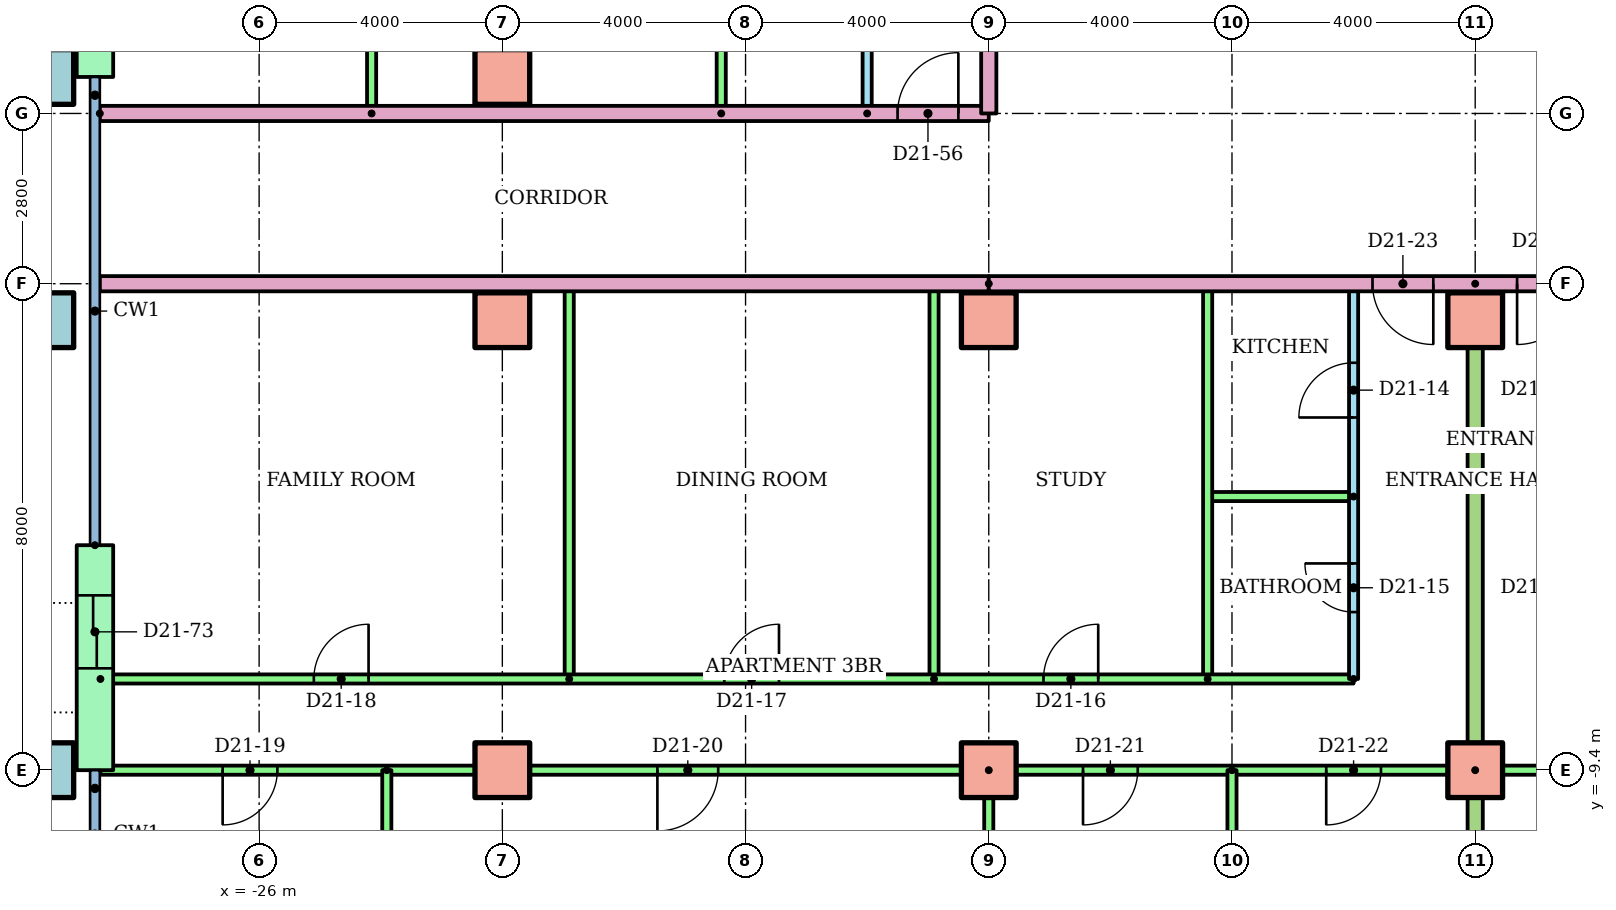
"""IFC4 building model, lengths in metres.
Left out: names, types, materials, properties, quantities, classifications, styles, units other than length and angle.
Written with IfcOpenShell. Run it as: python <this file> out.ifc"""

import sys

from ifc_helpers import new_model, si_unit, direction, frame, frame_2d, origin, origin_2d, place, context, subcontext, project, spatial, rectangle, hollow_rectangle, extrude, element, fill, save


model = new_model("IFC4")
c1 = context("Model", 3, precision=1e-05, world=origin(), true_north=direction((0.0, 1.0)))
c2 = subcontext(c1, "Body", "Model", "MODEL_VIEW")
j1 = project(units=[si_unit("LENGTHUNIT", "METRE"), si_unit("PLANEANGLEUNIT", "RADIAN")], contexts=[c1])
p1 = place(None, origin())
s1 = spatial("IfcSite", under=j1, at=p1, CompositionType="ELEMENT")
p2 = place(p1, origin())
s2 = spatial("IfcBuilding", under=s1, at=p2, CompositionType="ELEMENT")
p3 = place(p2, frame((0.0, 0.0, 83.9)))
s3 = spatial("IfcBuildingStorey", under=s2, at=p3, CompositionType="ELEMENT", Elevation=83.9)
p4 = place(p3, frame((-29.5, -9.4, 0.0)))
e1 = element("IfcColumn", 1, at=p4, inside=s3, PredefinedType="COLUMN", context=c2, shape_type="SweptSolid", body=[
    extrude(hollow_rectangle(XDim=0.9, YDim=0.9, WallThickness=0.045, at=origin_2d()), origin(), (0.0, 0.0, 1.0), 3.2),
])
for number, where in (
    (2, (-22.0, -9.4, 0.0)),
    (3, (-14.0, -9.4, 0.0)),
    (4, (-6.0, -9.4, 0.0)),
):
    element("IfcColumn", number, at=place(p3, frame(where)), inside=s3, PredefinedType="COLUMN", context=c2, shape_type="SweptSolid", body=[
        extrude(rectangle(XDim=0.9, YDim=0.9, at=origin_2d()), origin(), (0.0, 0.0, 1.0), 3.2),
    ])
p5 = place(p3, frame((-29.5, -2.0, 0.0)))
e5 = element("IfcColumn", 5, at=p5, inside=s3, PredefinedType="COLUMN", context=c2, shape_type="SweptSolid", body=[
    extrude(hollow_rectangle(XDim=0.9, YDim=0.9, WallThickness=0.045, at=origin_2d()), origin(), (0.0, 0.0, 1.0), 3.2),
])
for number, where in (
    (6, (-22.0, -2.0, 0.0)),
    (7, (-14.0, -2.0, 0.0)),
    (8, (-6.0, -2.0, 0.0)),
):
    element("IfcColumn", number, at=place(p3, frame(where)), inside=s3, PredefinedType="COLUMN", context=c2, shape_type="SweptSolid", body=[
        extrude(rectangle(XDim=0.9, YDim=0.9, at=origin_2d()), origin(), (0.0, 0.0, 1.0), 3.2),
    ])
p6 = place(p3, frame((-29.5, 2.0, 0.0)))
e9 = element("IfcColumn", 9, at=p6, inside=s3, PredefinedType="COLUMN", context=c2, shape_type="SweptSolid", body=[
    extrude(hollow_rectangle(XDim=0.9, YDim=0.9, WallThickness=0.045, at=origin_2d()), origin(), (0.0, 0.0, 1.0), 3.2),
])
p7 = place(p3, frame((-22.0, 2.0, 0.0)))
e10 = element("IfcColumn", 10, at=p7, inside=s3, PredefinedType="COLUMN", context=c2, shape_type="SweptSolid", body=[
    extrude(rectangle(XDim=0.9, YDim=0.9, at=origin_2d()), origin(), (0.0, 0.0, 1.0), 3.2),
])
p8 = place(p3, frame((-28.7, 6.5, 0.0), z_axis=(0.0, 0.0, 1.0), x_axis=(0.0, -1.0, 0.0)))
e11 = element("IfcWall", 11, at=p8, inside=s3, PredefinedType="STANDARD", context=c2, shape_type="SweptSolid", body=[
    extrude(rectangle(XDim=4.5, YDim=0.6, at=frame_2d((2.25, 0.0))), origin(), (0.0, 0.0, 1.0), 2.92),
])
p9 = place(p8, frame((1.65, 0.0, 0.0)))
e12 = element("IfcOpeningElement", 12, at=p9, cuts=e11, PredefinedType="OPENING", context=c2, shape_type="SweptSolid", body=[
    extrude(rectangle(XDim=1.2, YDim=2.1, at=frame_2d((0.6, 1.05))), frame((0.0, 0.31, 0.0), z_axis=(0.0, -1.0, 0.0), x_axis=(1.0, 0.0, 0.0)), (0.0, 0.0, 1.0), 0.62),
])
p10 = place(p3, frame((-28.7, -5.7, 0.0), z_axis=(0.0, 0.0, 1.0), x_axis=(0.0, -1.0, 0.0)))
e13 = element("IfcWall", 13, at=p10, inside=s3, PredefinedType="STANDARD", context=c2, shape_type="SweptSolid", body=[
    extrude(rectangle(XDim=3.7, YDim=0.6, at=frame_2d((1.85, 0.0))), origin(), (0.0, 0.0, 1.0), 2.92),
])
p11 = place(p10, frame((0.825, 0.0, 0.0)))
e14 = element("IfcOpeningElement", 14, at=p11, cuts=e13, PredefinedType="OPENING", context=c2, shape_type="SweptSolid", body=[
    extrude(rectangle(XDim=1.2, YDim=2.1, at=frame_2d((0.6, 1.05))), frame((0.0, 0.31, 0.0), z_axis=(0.0, -1.0, 0.0), x_axis=(1.0, 0.0, 0.0)), (0.0, 0.0, 1.0), 0.62),
])
p12 = place(p3, frame((-8.0, -7.9, 0.0), z_axis=(0.0, 0.0, 1.0), x_axis=(0.0, 1.0, 0.0)))
e15 = element("IfcWall", 15, at=p12, inside=s3, PredefinedType="PARTITIONING", context=c2, shape_type="SweptSolid", body=[
    extrude(rectangle(XDim=6.5, YDim=0.15, at=frame_2d((3.25, 0.0))), origin(), (0.0, 0.0, 1.0), 2.4),
])
p13 = place(p12, frame((4.3, 0.0, 0.0)))
e16 = element("IfcOpeningElement", 16, at=p13, cuts=e15, PredefinedType="OPENING", context=c2, shape_type="SweptSolid", body=[
    extrude(rectangle(XDim=0.9, YDim=2.1, at=frame_2d((0.45, 1.05))), frame((0.0, 0.085, 0.0), z_axis=(0.0, -1.0, 0.0), x_axis=(1.0, 0.0, 0.0)), (0.0, 0.0, 1.0), 0.17),
])
p14 = place(p12, frame((1.1, 0.0, 0.0)))
e17 = element("IfcOpeningElement", 17, at=p14, cuts=e15, PredefinedType="OPENING", context=c2, shape_type="SweptSolid", body=[
    extrude(rectangle(XDim=0.8, YDim=2.1, at=frame_2d((0.4, 1.05))), frame((0.0, 0.085, 0.0), z_axis=(0.0, -1.0, 0.0), x_axis=(1.0, 0.0, 0.0)), (0.0, 0.0, 1.0), 0.17),
])
p15 = place(p3, frame((-8.0, -4.9, 0.0), z_axis=(0.0, 0.0, 1.0), x_axis=(-1.0, 0.0, 0.0)))
e18 = element("IfcWall", 18, at=p15, inside=s3, PredefinedType="PARTITIONING", context=c2, shape_type="SweptSolid", body=[
    extrude(rectangle(XDim=2.4, YDim=0.15, at=frame_2d((1.2, 0.0))), origin(), (0.0, 0.0, 1.0), 2.4),
])
for number, where, z_axis, x_axis in (
    (19, (-10.4, -7.9, 0.0), (0.0, 0.0, 1.0), (0.0, 1.0, 0.0)),
    (20, (-14.9, -7.9, 0.0), (0.0, 0.0, 1.0), (0.0, 1.0, 0.0)),
    (21, (-20.9, -7.9, 0.0), (0.0, 0.0, 1.0), (0.0, 1.0, 0.0)),
):
    element("IfcWall", number, at=place(p3, frame(where, z_axis=z_axis, x_axis=x_axis)), inside=s3, PredefinedType="PARTITIONING", context=c2, shape_type="SweptSolid", body=[
        extrude(rectangle(XDim=6.5, YDim=0.15, at=frame_2d((3.25, 0.0))), origin(), (0.0, 0.0, 1.0), 2.4),
    ])
p16 = place(p3, frame((-28.61, -7.9, 0.0)))
e22 = element("IfcWall", 22, at=p16, inside=s3, PredefinedType="PARTITIONING", context=c2, shape_type="SweptSolid", body=[
    extrude(rectangle(XDim=20.61, YDim=0.15, at=frame_2d((10.305, 0.0))), origin(), (0.0, 0.0, 1.0), 2.4),
])
p17 = place(p16, frame((15.51, 0.0, 0.0)))
e23 = element("IfcOpeningElement", 23, at=p17, cuts=e22, PredefinedType="OPENING", context=c2, shape_type="SweptSolid", body=[
    extrude(rectangle(XDim=0.9, YDim=2.1, at=frame_2d((0.45, 1.05))), frame((0.0, 0.085, 0.0), z_axis=(0.0, -1.0, 0.0), x_axis=(1.0, 0.0, 0.0)), (0.0, 0.0, 1.0), 0.17),
])
p18 = place(p16, frame((10.26, 0.0, 0.0)))
e24 = element("IfcOpeningElement", 24, at=p18, cuts=e22, PredefinedType="OPENING", context=c2, shape_type="SweptSolid", body=[
    extrude(rectangle(XDim=0.9, YDim=2.1, at=frame_2d((0.45, 1.05))), frame((0.0, 0.085, 0.0), z_axis=(0.0, -1.0, 0.0), x_axis=(1.0, 0.0, 0.0)), (0.0, 0.0, 1.0), 0.17),
])
p19 = place(p16, frame((3.51, 0.0, 0.0)))
e25 = element("IfcOpeningElement", 25, at=p19, cuts=e22, PredefinedType="OPENING", context=c2, shape_type="SweptSolid", body=[
    extrude(rectangle(XDim=0.9, YDim=2.1, at=frame_2d((0.45, 1.05))), frame((0.0, 0.085, 0.0), z_axis=(0.0, -1.0, 0.0), x_axis=(1.0, 0.0, 0.0)), (0.0, 0.0, 1.0), 0.17),
])
p20 = place(p3, frame((-6.0, -9.4, 0.0), z_axis=(0.0, 0.0, 1.0), x_axis=(-1.0, 0.0, 0.0)))
e26 = element("IfcWall", 26, at=p20, inside=s3, PredefinedType="PARTITIONING", context=c2, shape_type="SweptSolid", body=[
    extrude(rectangle(XDim=22.61, YDim=0.15, at=frame_2d((11.305, 0.0))), origin(), (0.0, 0.0, 1.0), 2.4),
])
p21 = place(p20, frame((19.7, 0.0, 0.0)))
e27 = element("IfcOpeningElement", 27, at=p21, cuts=e26, PredefinedType="OPENING", context=c2, shape_type="SweptSolid", body=[
    extrude(rectangle(XDim=0.9, YDim=2.1, at=frame_2d((0.45, 1.05))), frame((0.0, 0.085, 0.0), z_axis=(0.0, -1.0, 0.0), x_axis=(1.0, 0.0, 0.0)), (0.0, 0.0, 1.0), 0.17),
])
p22 = place(p20, frame((12.45, 0.0, 0.0)))
e28 = element("IfcOpeningElement", 28, at=p22, cuts=e26, PredefinedType="OPENING", context=c2, shape_type="SweptSolid", body=[
    extrude(rectangle(XDim=1.0, YDim=2.1, at=frame_2d((0.5, 1.05))), frame((0.0, 0.085, 0.0), z_axis=(0.0, -1.0, 0.0), x_axis=(1.0, 0.0, 0.0)), (0.0, 0.0, 1.0), 0.17),
])
p23 = place(p20, frame((5.55, 0.0, 0.0)))
e29 = element("IfcOpeningElement", 29, at=p23, cuts=e26, PredefinedType="OPENING", context=c2, shape_type="SweptSolid", body=[
    extrude(rectangle(XDim=0.9, YDim=2.1, at=frame_2d((0.45, 1.05))), frame((0.0, 0.085, 0.0), z_axis=(0.0, -1.0, 0.0), x_axis=(1.0, 0.0, 0.0)), (0.0, 0.0, 1.0), 0.17),
])
p24 = place(p20, frame((1.55, 0.0, 0.0)))
e30 = element("IfcOpeningElement", 30, at=p24, cuts=e26, PredefinedType="OPENING", context=c2, shape_type="SweptSolid", body=[
    extrude(rectangle(XDim=0.9, YDim=2.1, at=frame_2d((0.45, 1.05))), frame((0.0, 0.085, 0.0), z_axis=(0.0, -1.0, 0.0), x_axis=(1.0, 0.0, 0.0)), (0.0, 0.0, 1.0), 0.17),
])
p25 = place(p3, frame((-23.9, -9.4, 0.0), z_axis=(0.0, 0.0, 1.0), x_axis=(0.0, -1.0, 0.0)))
e31 = element("IfcWall", 31, at=p25, inside=s3, PredefinedType="PARTITIONING", context=c2, shape_type="SweptSolid", body=[
    extrude(rectangle(XDim=5.02, YDim=0.15, at=frame_2d((2.51, 0.0))), origin(), (0.0, 0.0, 1.0), 2.4),
])
p26 = place(p3, frame((-14.0, -9.4, 0.0), z_axis=(0.0, 0.0, 1.0), x_axis=(0.0, -1.0, 0.0)))
e32 = element("IfcWall", 32, at=p26, inside=s3, PredefinedType="PARTITIONING", context=c2, shape_type="SweptSolid", body=[
    extrude(rectangle(XDim=6.81, YDim=0.15, at=frame_2d((3.405, 0.0))), origin(), (0.0, 0.0, 1.0), 2.4),
])
p27 = place(p3, frame((-10.0, -9.4, 0.0), z_axis=(0.0, 0.0, 1.0), x_axis=(0.0, -1.0, 0.0)))
e33 = element("IfcWall", 33, at=p27, inside=s3, PredefinedType="PARTITIONING", context=c2, shape_type="SweptSolid", body=[
    extrude(rectangle(XDim=6.821, YDim=0.15, at=frame_2d((3.411, 0.0))), origin(), (0.0, 0.0, 1.0), 2.4),
])
p28 = place(p3, frame((10.0, -9.4, 0.0), z_axis=(0.0, 0.0, 1.0), x_axis=(-1.0, 0.0, 0.0)))
e34 = element("IfcWall", 34, at=p28, inside=s3, PredefinedType="PARTITIONING", context=c2, shape_type="SweptSolid", body=[
    extrude(rectangle(XDim=16.0, YDim=0.15, at=frame_2d((8.0, 0.0))), origin(), (0.0, 0.0, 1.0), 2.4),
])
p29 = place(p28, frame((13.55, 0.0, 0.0)))
e35 = element("IfcOpeningElement", 35, at=p29, cuts=e34, PredefinedType="OPENING", context=c2, shape_type="SweptSolid", body=[
    extrude(rectangle(XDim=0.9, YDim=2.1, at=frame_2d((0.45, 1.05))), frame((0.0, 0.085, 0.0), z_axis=(0.0, -1.0, 0.0), x_axis=(1.0, 0.0, 0.0)), (0.0, 0.0, 1.0), 0.17),
])
p30 = place(p28, frame((9.55, 0.0, 0.0)))
e36 = element("IfcOpeningElement", 36, at=p30, cuts=e34, PredefinedType="OPENING", context=c2, shape_type="SweptSolid", body=[
    extrude(rectangle(XDim=0.9, YDim=2.1, at=frame_2d((0.45, 1.05))), frame((0.0, 0.085, 0.0), z_axis=(0.0, -1.0, 0.0), x_axis=(1.0, 0.0, 0.0)), (0.0, 0.0, 1.0), 0.17),
])
p31 = place(p28, frame((3.5, 0.0, 0.0)))
e37 = element("IfcOpeningElement", 37, at=p31, cuts=e34, PredefinedType="OPENING", context=c2, shape_type="SweptSolid", body=[
    extrude(rectangle(XDim=1.0, YDim=2.1, at=frame_2d((0.5, 1.05))), frame((0.0, 0.085, 0.0), z_axis=(0.0, -1.0, 0.0), x_axis=(1.0, 0.0, 0.0)), (0.0, 0.0, 1.0), 0.17),
])
p32 = place(p3, frame((-6.0, -1.4, 0.0), z_axis=(0.0, 0.0, 1.0), x_axis=(0.0, -1.0, 0.0)))
e38 = element("IfcWall", 38, at=p32, inside=s3, PredefinedType="PARTITIONING", context=c2, shape_type="SweptSolid", body=[
    extrude(rectangle(XDim=14.81, YDim=0.25, at=frame_2d((7.405, 0.0))), origin(), (0.0, 0.0, 1.0), 2.4),
])
p33 = place(p3, frame((-14.0, -1.4, 0.0), z_axis=(0.0, 0.0, 1.0), x_axis=(-1.0, 0.0, 0.0)))
e39 = element("IfcWall", 39, at=p33, inside=s3, PredefinedType="PARTITIONING", context=c2, shape_type="SweptSolid", body=[
    extrude(rectangle(XDim=14.62, YDim=0.25, at=frame_2d((7.31, 0.0))), origin(), (0.0, 0.0, 1.0), 2.4),
])
p34 = place(p3, frame((-16.0, 1.4, 0.0), z_axis=(0.0, 0.0, 1.0), x_axis=(0.0, 1.0, 0.0)))
e40 = element("IfcWall", 40, at=p34, inside=s3, PredefinedType="PARTITIONING", context=c2, shape_type="SweptSolid", body=[
    extrude(rectangle(XDim=8.9, YDim=0.15, at=frame_2d((4.45, 0.0))), origin(), (0.0, 0.0, 1.0), 2.4),
])
p35 = place(p34, frame((2.05, 0.0, 0.0)))
e41 = element("IfcOpeningElement", 41, at=p35, cuts=e40, PredefinedType="OPENING", context=c2, shape_type="SweptSolid", body=[
    extrude(rectangle(XDim=0.9, YDim=2.1, at=frame_2d((0.45, 1.05))), frame((0.0, 0.085, 0.0), z_axis=(0.0, -1.0, 0.0), x_axis=(1.0, 0.0, 0.0)), (0.0, 0.0, 1.0), 0.17),
])
p36 = place(p34, frame((6.55, 0.0, 0.0)))
e42 = element("IfcOpeningElement", 42, at=p36, cuts=e40, PredefinedType="OPENING", context=c2, shape_type="SweptSolid", body=[
    extrude(rectangle(XDim=0.8, YDim=2.1, at=frame_2d((0.4, 1.05))), frame((0.0, 0.085, 0.0), z_axis=(0.0, -1.0, 0.0), x_axis=(1.0, 0.0, 0.0)), (0.0, 0.0, 1.0), 0.17),
])
for number, where, z_axis, x_axis in (
    (43, (-18.4, 1.4, 0.0), (0.0, 0.0, 1.0), (0.0, 1.0, 0.0)),
    (44, (-24.15, 1.4, 0.0), (0.0, 0.0, 1.0), (0.0, 1.0, 0.0)),
):
    element("IfcWall", number, at=place(p3, frame(where, z_axis=z_axis, x_axis=x_axis)), inside=s3, PredefinedType="PARTITIONING", context=c2, shape_type="SweptSolid", body=[
        extrude(rectangle(XDim=8.9, YDim=0.15, at=frame_2d((4.45, 0.0))), origin(), (0.0, 0.0, 1.0), 2.4),
    ])
p37 = place(p3, frame((-28.62, 1.4, 0.0)))
e45 = element("IfcWall", 45, at=p37, inside=s3, PredefinedType="PARTITIONING", context=c2, shape_type="SweptSolid", body=[
    extrude(rectangle(XDim=14.62, YDim=0.25, at=frame_2d((7.31, 0.0))), origin(), (0.0, 0.0, 1.0), 2.4),
])
p38 = place(p37, frame((13.12, 0.0, 0.0)))
e46 = element("IfcOpeningElement", 46, at=p38, cuts=e45, PredefinedType="OPENING", context=c2, shape_type="SweptSolid", body=[
    extrude(rectangle(XDim=1.0, YDim=2.1, at=frame_2d((0.5, 1.05))), frame((0.0, 0.135, 0.0), z_axis=(0.0, -1.0, 0.0), x_axis=(1.0, 0.0, 0.0)), (0.0, 0.0, 1.0), 0.27),
])
p39 = place(p3, frame((14.0, -1.4, 0.0), z_axis=(0.0, 0.0, 1.0), x_axis=(-1.0, 0.0, 0.0)))
e47 = element("IfcWall", 47, at=p39, inside=s3, PredefinedType="PARTITIONING", context=c2, shape_type="SweptSolid", body=[
    extrude(rectangle(XDim=28.0, YDim=0.25, at=frame_2d((14.0, 0.0))), origin(), (0.0, 0.0, 1.0), 2.4),
])
p40 = place(p39, frame((20.689, 0.0, 0.0)))
e48 = element("IfcOpeningElement", 48, at=p40, cuts=e47, PredefinedType="OPENING", context=c2, shape_type="SweptSolid", body=[
    extrude(rectangle(XDim=1.0, YDim=2.1, at=frame_2d((0.5, 1.05))), frame((0.0, 0.135, 0.0), z_axis=(0.0, -1.0, 0.0), x_axis=(1.0, 0.0, 0.0)), (0.0, 0.0, 1.0), 0.27),
])
p41 = place(p39, frame((18.311, 0.0, 0.0)))
e49 = element("IfcOpeningElement", 49, at=p41, cuts=e47, PredefinedType="OPENING", context=c2, shape_type="SweptSolid", body=[
    extrude(rectangle(XDim=1.0, YDim=2.1, at=frame_2d((0.5, 1.05))), frame((0.0, 0.135, 0.0), z_axis=(0.0, -1.0, 0.0), x_axis=(1.0, 0.0, 0.0)), (0.0, 0.0, 1.0), 0.27),
])
p42 = place(p39, frame((2.311, 0.0, 0.0)))
e50 = element("IfcOpeningElement", 50, at=p42, cuts=e47, PredefinedType="OPENING", context=c2, shape_type="SweptSolid", body=[
    extrude(rectangle(XDim=1.0, YDim=2.1, at=frame_2d((0.5, 1.05))), frame((0.0, 0.135, 0.0), z_axis=(0.0, -1.0, 0.0), x_axis=(1.0, 0.0, 0.0)), (0.0, 0.0, 1.0), 0.27),
])
p43 = place(p3, frame((-14.0, 3.0, 0.0), z_axis=(0.0, 0.0, 1.0), x_axis=(0.0, -1.0, 0.0)))
e51 = element("IfcWall", 51, at=p43, inside=s3, PredefinedType="PARTITIONING", context=c2, shape_type="SweptSolid", body=[
    extrude(rectangle(XDim=1.6, YDim=0.25, at=frame_2d((0.8, 0.0))), origin(), (0.0, 0.0, 1.0), 2.4),
])
p44 = place(p13, origin())
e52 = element("IfcDoor", 52, at=p44, inside=s3, OperationType="SINGLE_SWING_LEFT", PredefinedType="DOOR", context=c2, shape_type="SweptSolid", body=[
    extrude(rectangle(XDim=0.9, YDim=2.1, at=frame_2d((0.45, 1.05))), frame((0.0, 0.025, 0.0), z_axis=(0.0, -1.0, 0.0), x_axis=(1.0, 0.0, 0.0)), (0.0, 0.0, 1.0), 0.05),
])
fill(e16, e52)
p45 = place(p14, origin())
e53 = element("IfcDoor", 53, at=p45, inside=s3, OperationType="SINGLE_SWING_RIGHT", PredefinedType="DOOR", context=c2, shape_type="SweptSolid", body=[
    extrude(rectangle(XDim=0.8, YDim=2.1, at=frame_2d((0.4, 1.05))), frame((0.0, 0.025, 0.0), z_axis=(0.0, -1.0, 0.0), x_axis=(1.0, 0.0, 0.0)), (0.0, 0.0, 1.0), 0.05),
])
fill(e17, e53)
p46 = place(p17, origin())
e54 = element("IfcDoor", 54, at=p46, inside=s3, OperationType="SINGLE_SWING_RIGHT", PredefinedType="DOOR", context=c2, shape_type="SweptSolid", body=[
    extrude(rectangle(XDim=0.9, YDim=2.1, at=frame_2d((0.45, 1.05))), frame((0.0, 0.025, 0.0), z_axis=(0.0, -1.0, 0.0), x_axis=(1.0, 0.0, 0.0)), (0.0, 0.0, 1.0), 0.05),
])
fill(e23, e54)
p47 = place(p18, origin())
e55 = element("IfcDoor", 55, at=p47, inside=s3, OperationType="SINGLE_SWING_RIGHT", PredefinedType="DOOR", context=c2, shape_type="SweptSolid", body=[
    extrude(rectangle(XDim=0.9, YDim=2.1, at=frame_2d((0.45, 1.05))), frame((0.0, 0.025, 0.0), z_axis=(0.0, -1.0, 0.0), x_axis=(1.0, 0.0, 0.0)), (0.0, 0.0, 1.0), 0.05),
])
fill(e24, e55)
p48 = place(p19, origin())
e56 = element("IfcDoor", 56, at=p48, inside=s3, OperationType="SINGLE_SWING_RIGHT", PredefinedType="DOOR", context=c2, shape_type="SweptSolid", body=[
    extrude(rectangle(XDim=0.9, YDim=2.1, at=frame_2d((0.45, 1.05))), frame((0.0, 0.025, 0.0), z_axis=(0.0, -1.0, 0.0), x_axis=(1.0, 0.0, 0.0)), (0.0, 0.0, 1.0), 0.05),
])
fill(e25, e56)
p49 = place(p21, origin())
e57 = element("IfcDoor", 57, at=p49, inside=s3, OperationType="SINGLE_SWING_RIGHT", PredefinedType="DOOR", context=c2, shape_type="SweptSolid", body=[
    extrude(rectangle(XDim=0.9, YDim=2.1, at=frame_2d((0.45, 1.05))), frame((0.0, 0.025, 0.0), z_axis=(0.0, -1.0, 0.0), x_axis=(1.0, 0.0, 0.0)), (0.0, 0.0, 1.0), 0.05),
])
fill(e27, e57)
p50 = place(p22, origin())
e58 = element("IfcDoor", 58, at=p50, inside=s3, OperationType="SINGLE_SWING_RIGHT", PredefinedType="DOOR", context=c2, shape_type="SweptSolid", body=[
    extrude(rectangle(XDim=1.0, YDim=2.1, at=frame_2d((0.5, 1.05))), frame((0.0, 0.025, 0.0), z_axis=(0.0, -1.0, 0.0), x_axis=(1.0, 0.0, 0.0)), (0.0, 0.0, 1.0), 0.05),
])
fill(e28, e58)
p51 = place(p23, origin())
e59 = element("IfcDoor", 59, at=p51, inside=s3, OperationType="SINGLE_SWING_RIGHT", PredefinedType="DOOR", context=c2, shape_type="SweptSolid", body=[
    extrude(rectangle(XDim=0.9, YDim=2.1, at=frame_2d((0.45, 1.05))), frame((0.0, 0.025, 0.0), z_axis=(0.0, -1.0, 0.0), x_axis=(1.0, 0.0, 0.0)), (0.0, 0.0, 1.0), 0.05),
])
fill(e29, e59)
p52 = place(p24, origin())
e60 = element("IfcDoor", 60, at=p52, inside=s3, OperationType="SINGLE_SWING_RIGHT", PredefinedType="DOOR", context=c2, shape_type="SweptSolid", body=[
    extrude(rectangle(XDim=0.9, YDim=2.1, at=frame_2d((0.45, 1.05))), frame((0.0, 0.025, 0.0), z_axis=(0.0, -1.0, 0.0), x_axis=(1.0, 0.0, 0.0)), (0.0, 0.0, 1.0), 0.05),
])
fill(e30, e60)
p53 = place(p40, origin())
e61 = element("IfcDoor", 61, at=p53, inside=s3, OperationType="SINGLE_SWING_LEFT", PredefinedType="DOOR", context=c2, shape_type="SweptSolid", body=[
    extrude(rectangle(XDim=1.0, YDim=2.1, at=frame_2d((0.5, 1.05))), frame((0.0, 0.025, 0.0), z_axis=(0.0, -1.0, 0.0), x_axis=(1.0, 0.0, 0.0)), (0.0, 0.0, 1.0), 0.05),
])
fill(e48, e61)
p54 = place(p41, origin())
e62 = element("IfcDoor", 62, at=p54, inside=s3, OperationType="SINGLE_SWING_RIGHT", PredefinedType="DOOR", context=c2, shape_type="SweptSolid", body=[
    extrude(rectangle(XDim=1.0, YDim=2.1, at=frame_2d((0.5, 1.05))), frame((0.0, 0.025, 0.0), z_axis=(0.0, -1.0, 0.0), x_axis=(1.0, 0.0, 0.0)), (0.0, 0.0, 1.0), 0.05),
])
fill(e49, e62)
p55 = place(p38, origin())
e63 = element("IfcDoor", 63, at=p55, inside=s3, OperationType="SINGLE_SWING_RIGHT", PredefinedType="DOOR", context=c2, shape_type="SweptSolid", body=[
    extrude(rectangle(XDim=1.0, YDim=2.1, at=frame_2d((0.5, 1.05))), frame((0.0, 0.025, 0.0), z_axis=(0.0, -1.0, 0.0), x_axis=(1.0, 0.0, 0.0)), (0.0, 0.0, 1.0), 0.05),
])
fill(e46, e63)
p56 = place(p11, origin())
e64 = element("IfcDoor", 64, at=p56, inside=s3, OperationType="SLIDING_TO_LEFT", PredefinedType="DOOR", context=c2, shape_type="SweptSolid", body=[
    extrude(rectangle(XDim=1.2, YDim=2.1, at=frame_2d((0.6, 1.05))), frame((0.0, 0.025, 0.0), z_axis=(0.0, -1.0, 0.0), x_axis=(1.0, 0.0, 0.0)), (0.0, 0.0, 1.0), 0.05),
])
fill(e14, e64)
save(model, sys.argv[1])
